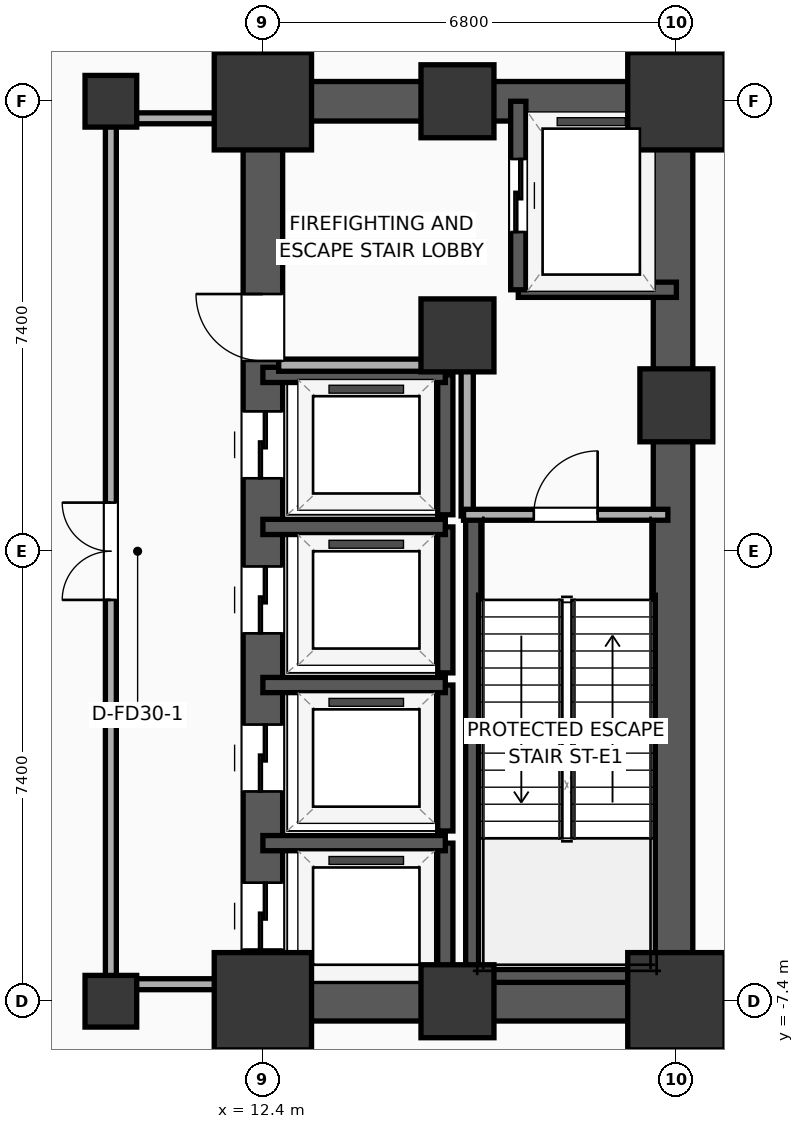
"""IFC4 building model, lengths in metres.
Left out: names, types, materials, properties, quantities, classifications, styles, units other than length and angle.
Written with IfcOpenShell. Run it as: python <this file> out.ifc"""

import sys

from ifc_helpers import new_model, si_unit, direction, frame, frame_2d, origin, origin_2d, place, context, subcontext, project, spatial, rectangle, extrude, element, fill, save


model = new_model("IFC4")
c1 = context("Model", 3, precision=1e-05, world=origin(), true_north=direction((0.0, 1.0)))
c2 = subcontext(c1, "Body", "Model", "MODEL_VIEW")
j1 = project(units=[si_unit("LENGTHUNIT", "METRE"), si_unit("PLANEANGLEUNIT", "RADIAN")], contexts=[c1])
p1 = place(None, origin())
s1 = spatial("IfcSite", under=j1, at=p1, CompositionType="ELEMENT")
p2 = place(p1, origin())
s2 = spatial("IfcBuilding", under=s1, at=p2, CompositionType="ELEMENT")
p3 = place(p2, frame((0.0, 0.0, -5.2)))
s3 = spatial("IfcBuildingStorey", under=s2, at=p3, CompositionType="ELEMENT", Elevation=-5.2)
p4 = place(p3, frame((12.4, -7.4, 0.0), z_axis=(0.0, 0.0, 1.0), x_axis=(1.0, 0.0, 0.0)))
e1 = element("IfcColumn", 1, at=p4, inside=s3, PredefinedType="COLUMN", context=c2, shape_type="SweptSolid", body=[
    extrude(rectangle(XDim=1.6, YDim=1.6, at=origin_2d()), origin(), (0.0, 0.0, 1.0), 5.2),
])
p5 = place(p3, frame((15.6, 3.55, 0.0), z_axis=(0.0, 0.0, 1.0), x_axis=(1.0, 0.0, 0.0)))
e2 = element("IfcColumn", 2, at=p5, inside=s3, PredefinedType="COLUMN", context=c2, shape_type="SweptSolid", body=[
    extrude(rectangle(XDim=1.2, YDim=1.2, at=origin_2d()), origin(), (0.0, 0.0, 1.0), 5.2),
])
p6 = place(p3, frame((12.4, 7.4, 0.0), z_axis=(0.0, 0.0, 1.0), x_axis=(1.0, 0.0, 0.0)))
e3 = element("IfcColumn", 3, at=p6, inside=s3, PredefinedType="COLUMN", context=c2, shape_type="SweptSolid", body=[
    extrude(rectangle(XDim=1.6, YDim=1.6, at=origin_2d()), origin(), (0.0, 0.0, 1.0), 5.2),
])
for number, where, z_axis, x_axis in (
    (4, (15.6, -7.4, 0.0), (0.0, 0.0, 1.0), (1.0, 0.0, 0.0)),
    (5, (15.6, 7.4, 0.0), (0.0, 0.0, 1.0), (1.0, 0.0, 0.0)),
):
    element("IfcColumn", number, at=place(p3, frame(where, z_axis=z_axis, x_axis=x_axis)), inside=s3, PredefinedType="COLUMN", context=c2, shape_type="SweptSolid", body=[
        extrude(rectangle(XDim=1.2, YDim=1.2, at=origin_2d()), origin(), (0.0, 0.0, 1.0), 5.2),
    ])
p7 = place(p3, frame((19.2, -7.4, 0.0), z_axis=(0.0, 0.0, 1.0), x_axis=(1.0, 0.0, 0.0)))
e6 = element("IfcColumn", 6, at=p7, inside=s3, PredefinedType="COLUMN", context=c2, shape_type="SweptSolid", body=[
    extrude(rectangle(XDim=1.6, YDim=1.6, at=origin_2d()), origin(), (0.0, 0.0, 1.0), 5.2),
])
p8 = place(p3, frame((19.2, 2.4, 0.0), z_axis=(0.0, 0.0, 1.0), x_axis=(1.0, 0.0, 0.0)))
e7 = element("IfcColumn", 7, at=p8, inside=s3, PredefinedType="COLUMN", context=c2, shape_type="SweptSolid", body=[
    extrude(rectangle(XDim=1.2, YDim=1.2, at=origin_2d()), origin(), (0.0, 0.0, 1.0), 5.2),
])
p9 = place(p3, frame((19.2, 7.4, 0.0), z_axis=(0.0, 0.0, 1.0), x_axis=(1.0, 0.0, 0.0)))
e8 = element("IfcColumn", 8, at=p9, inside=s3, PredefinedType="COLUMN", context=c2, shape_type="SweptSolid", body=[
    extrude(rectangle(XDim=1.6, YDim=1.6, at=origin_2d()), origin(), (0.0, 0.0, 1.0), 5.2),
])
for number, where, z_axis, x_axis in (
    (9, (12.075, -7.4, 0.0), (0.0, 0.0, 1.0), (1.0, 0.0, 0.0)),
    (10, (12.075, 7.4, 0.0), (0.0, 0.0, 1.0), (1.0, 0.0, 0.0)),
):
    element("IfcWall", number, at=place(p3, frame(where, z_axis=z_axis, x_axis=x_axis)), inside=s3, PredefinedType="SHEAR", context=c2, shape_type="SweptSolid", body=[
        extrude(rectangle(XDim=7.45, YDim=0.65, at=frame_2d((3.725, 0.0))), origin(), (0.0, 0.0, 1.0), 4.92),
    ])
p10 = place(p3, frame((12.4, -7.4, 0.0), z_axis=(0.0, 0.0, 1.0), x_axis=(0.0, 1.0, 0.0)))
e11 = element("IfcWall", 11, at=p10, inside=s3, PredefinedType="SHEAR", context=c2, shape_type="SweptSolid", body=[
    extrude(rectangle(XDim=14.8, YDim=0.65, at=frame_2d((7.4, 0.0))), origin(), (0.0, 0.0, 1.0), 4.92),
])
p11 = place(p10, frame((0.85, 0.0, 0.0)))
e12 = element("IfcOpeningElement", 12, at=p11, cuts=e11, PredefinedType="OPENING", context=c2, shape_type="SweptSolid", body=[
    extrude(rectangle(XDim=1.1, YDim=2.05, at=frame_2d((0.55, 1.025))), frame((0.0, 0.335, 0.0), z_axis=(0.0, -1.0, 0.0), x_axis=(1.0, 0.0, 0.0)), (0.0, 0.0, 1.0), 0.67),
])
p12 = place(p10, frame((3.45, 0.0, 0.0)))
e13 = element("IfcOpeningElement", 13, at=p12, cuts=e11, PredefinedType="OPENING", context=c2, shape_type="SweptSolid", body=[
    extrude(rectangle(XDim=1.1, YDim=2.05, at=frame_2d((0.55, 1.025))), frame((0.0, 0.335, 0.0), z_axis=(0.0, -1.0, 0.0), x_axis=(1.0, 0.0, 0.0)), (0.0, 0.0, 1.0), 0.67),
])
p13 = place(p10, frame((6.05, 0.0, 0.0)))
e14 = element("IfcOpeningElement", 14, at=p13, cuts=e11, PredefinedType="OPENING", context=c2, shape_type="SweptSolid", body=[
    extrude(rectangle(XDim=1.1, YDim=2.05, at=frame_2d((0.55, 1.025))), frame((0.0, 0.335, 0.0), z_axis=(0.0, -1.0, 0.0), x_axis=(1.0, 0.0, 0.0)), (0.0, 0.0, 1.0), 0.67),
])
p14 = place(p10, frame((8.6, 0.0, 0.0)))
e15 = element("IfcOpeningElement", 15, at=p14, cuts=e11, PredefinedType="OPENING", context=c2, shape_type="SweptSolid", body=[
    extrude(rectangle(XDim=1.1, YDim=2.05, at=frame_2d((0.55, 1.025))), frame((0.0, 0.335, 0.0), z_axis=(0.0, -1.0, 0.0), x_axis=(1.0, 0.0, 0.0)), (0.0, 0.0, 1.0), 0.67),
])
p15 = place(p10, frame((10.53, 0.0, 0.0)))
e16 = element("IfcOpeningElement", 16, at=p15, cuts=e11, PredefinedType="OPENING", context=c2, shape_type="SweptSolid", body=[
    extrude(rectangle(XDim=1.1, YDim=2.05, at=frame_2d((0.55, 1.025))), frame((0.0, 0.335, 0.0), z_axis=(0.0, -1.0, 0.0), x_axis=(1.0, 0.0, 0.0)), (0.0, 0.0, 1.0), 0.67),
])
p16 = place(p3, frame((19.145, -7.4, 0.0), z_axis=(0.0, 0.0, 1.0), x_axis=(0.0, 1.0, 0.0)))
e17 = element("IfcWall", 17, at=p16, inside=s3, PredefinedType="SHEAR", context=c2, shape_type="SweptSolid", body=[
    extrude(rectangle(XDim=14.8, YDim=0.65, at=frame_2d((7.4, 0.0))), origin(), (0.0, 0.0, 1.0), 4.92),
])
p17 = place(p3, frame((15.86, -7.085, 0.0), z_axis=(0.0, 0.0, 1.0), x_axis=(0.0, 1.0, 0.0)))
e18 = element("IfcWall", 18, at=p17, inside=s3, PredefinedType="SOLIDWALL", context=c2, shape_type="SweptSolid", body=[
    extrude(rectangle(XDim=7.685, YDim=0.25, at=frame_2d((3.843, 0.0))), origin(), (0.0, 0.0, 1.0), 4.92),
])
p18 = place(p3, frame((15.74, -6.965, 0.0), z_axis=(0.0, 0.0, 1.0), x_axis=(1.0, 0.0, 0.0)))
e19 = element("IfcWall", 19, at=p18, inside=s3, PredefinedType="SOLIDWALL", context=c2, shape_type="SweptSolid", body=[
    extrude(rectangle(XDim=3.46, YDim=0.25, at=frame_2d((1.73, 0.0))), origin(), (0.0, 0.0, 1.0), 4.92),
])
for number, where, z_axis, x_axis in (
    (20, (9.9, -7.4, 0.0), (0.0, 0.0, 1.0), (1.0, 0.0, 0.0)),
    (21, (9.9, 7.4, 0.0), (0.0, 0.0, 1.0), (1.0, 0.0, 0.0)),
):
    element("IfcColumn", number, at=place(p3, frame(where, z_axis=z_axis, x_axis=x_axis)), inside=s3, PredefinedType="COLUMN", context=c2, shape_type="SweptSolid", body=[
        extrude(rectangle(XDim=0.85, YDim=0.85, at=origin_2d()), origin(), (0.0, 0.0, 1.0), 5.2),
    ])
p19 = place(p3, frame((16.6, 4.3, 0.0), z_axis=(0.0, 0.0, 1.0), x_axis=(1.0, 0.0, 0.0)))
e22 = element("IfcWall", 22, at=p19, inside=s3, PredefinedType="SOLIDWALL", context=c2, shape_type="SweptSolid", body=[
    extrude(rectangle(XDim=2.6, YDim=0.25, at=frame_2d((1.3, 0.0))), origin(), (0.0, 0.0, 1.0), 4.92),
])
p20 = place(p3, frame((16.6, 7.4, 0.0), z_axis=(0.0, 0.0, 1.0), x_axis=(0.0, -1.0, 0.0)))
e23 = element("IfcWall", 23, at=p20, inside=s3, PredefinedType="SOLIDWALL", context=c2, shape_type="SweptSolid", body=[
    extrude(rectangle(XDim=3.1, YDim=0.25, at=frame_2d((1.55, 0.0))), origin(), (0.0, 0.0, 1.0), 4.92),
])
p21 = place(p20, frame((0.95, 0.0, 0.0)))
e24 = element("IfcOpeningElement", 24, at=p21, cuts=e23, PredefinedType="OPENING", context=c2, shape_type="SweptSolid", body=[
    extrude(rectangle(XDim=1.2, YDim=2.05, at=frame_2d((0.6, 1.025))), frame((0.0, 0.135, 0.0), z_axis=(0.0, -1.0, 0.0), x_axis=(1.0, 0.0, 0.0)), (0.0, 0.0, 1.0), 0.27),
])
p22 = place(p3, frame((15.4, -7.4, 0.0), z_axis=(0.0, 0.0, 1.0), x_axis=(0.0, 1.0, 0.0)))
e25 = element("IfcWall", 25, at=p22, inside=s3, PredefinedType="SOLIDWALL", context=c2, shape_type="SweptSolid", body=[
    extrude(rectangle(XDim=2.6, YDim=0.25, at=frame_2d((1.3, 0.0))), origin(), (0.0, 0.0, 1.0), 4.92),
])
p23 = place(p3, frame((15.4, -4.8, 0.0), z_axis=(0.0, 0.0, 1.0), x_axis=(-1.0, 0.0, 0.0)))
e26 = element("IfcWall", 26, at=p23, inside=s3, PredefinedType="SOLIDWALL", context=c2, shape_type="SweptSolid", body=[
    extrude(rectangle(XDim=3.0, YDim=0.25, at=frame_2d((1.5, 0.0))), origin(), (0.0, 0.0, 1.0), 4.92),
])
p24 = place(p3, frame((15.4, -4.6, 0.0), z_axis=(0.0, 0.0, 1.0), x_axis=(0.0, 1.0, 0.0)))
e27 = element("IfcWall", 27, at=p24, inside=s3, PredefinedType="SOLIDWALL", context=c2, shape_type="SweptSolid", body=[
    extrude(rectangle(XDim=2.4, YDim=0.25, at=frame_2d((1.2, 0.0))), origin(), (0.0, 0.0, 1.0), 4.92),
])
p25 = place(p3, frame((15.4, -2.2, 0.0), z_axis=(0.0, 0.0, 1.0), x_axis=(-1.0, 0.0, 0.0)))
e28 = element("IfcWall", 28, at=p25, inside=s3, PredefinedType="SOLIDWALL", context=c2, shape_type="SweptSolid", body=[
    extrude(rectangle(XDim=3.0, YDim=0.25, at=frame_2d((1.5, 0.0))), origin(), (0.0, 0.0, 1.0), 4.92),
])
p26 = place(p3, frame((15.4, -2.0, 0.0), z_axis=(0.0, 0.0, 1.0), x_axis=(0.0, 1.0, 0.0)))
e29 = element("IfcWall", 29, at=p26, inside=s3, PredefinedType="SOLIDWALL", context=c2, shape_type="SweptSolid", body=[
    extrude(rectangle(XDim=2.4, YDim=0.25, at=frame_2d((1.2, 0.0))), origin(), (0.0, 0.0, 1.0), 4.92),
])
p27 = place(p3, frame((15.4, 0.4, 0.0), z_axis=(0.0, 0.0, 1.0), x_axis=(-1.0, 0.0, 0.0)))
e30 = element("IfcWall", 30, at=p27, inside=s3, PredefinedType="SOLIDWALL", context=c2, shape_type="SweptSolid", body=[
    extrude(rectangle(XDim=3.0, YDim=0.25, at=frame_2d((1.5, 0.0))), origin(), (0.0, 0.0, 1.0), 4.92),
])
p28 = place(p3, frame((15.4, 0.6, 0.0), z_axis=(0.0, 0.0, 1.0), x_axis=(0.0, 1.0, 0.0)))
e31 = element("IfcWall", 31, at=p28, inside=s3, PredefinedType="SOLIDWALL", context=c2, shape_type="SweptSolid", body=[
    extrude(rectangle(XDim=2.3, YDim=0.25, at=frame_2d((1.15, 0.0))), origin(), (0.0, 0.0, 1.0), 4.92),
])
p29 = place(p3, frame((15.4, 2.9, 0.0), z_axis=(0.0, 0.0, 1.0), x_axis=(-1.0, 0.0, 0.0)))
e32 = element("IfcWall", 32, at=p29, inside=s3, PredefinedType="SOLIDWALL", context=c2, shape_type="SweptSolid", body=[
    extrude(rectangle(XDim=3.0, YDim=0.25, at=frame_2d((1.5, 0.0))), origin(), (0.0, 0.0, 1.0), 4.92),
])
p30 = place(p3, frame((15.76, 0.58, 0.0), z_axis=(0.0, 0.0, 1.0), x_axis=(0.0, 1.0, 0.0)))
e33 = element("IfcWall", 33, at=p30, inside=s3, PredefinedType="PARTITIONING", context=c2, shape_type="SweptSolid", body=[
    extrude(rectangle(XDim=2.52, YDim=0.2, at=frame_2d((1.26, 0.0))), origin(), (0.0, 0.0, 1.0), 4.92),
])
p31 = place(p3, frame((12.66, 3.06, 0.0), z_axis=(0.0, 0.0, 1.0), x_axis=(1.0, 0.0, 0.0)))
e34 = element("IfcWall", 34, at=p31, inside=s3, PredefinedType="PARTITIONING", context=c2, shape_type="SweptSolid", body=[
    extrude(rectangle(XDim=3.16, YDim=0.2, at=frame_2d((1.58, 0.0))), origin(), (0.0, 0.0, 1.0), 4.92),
])
p32 = place(p3, frame((15.7, 0.6, 0.0), z_axis=(0.0, 0.0, 1.0), x_axis=(1.0, 0.0, 0.0)))
e35 = element("IfcWall", 35, at=p32, inside=s3, PredefinedType="PARTITIONING", context=c2, shape_type="SweptSolid", body=[
    extrude(rectangle(XDim=3.36, YDim=0.18, at=frame_2d((1.68, 0.0))), origin(), (0.0, 0.0, 1.0), 4.92),
])
p33 = place(p32, frame((1.155, 0.0, 0.0)))
e36 = element("IfcOpeningElement", 36, at=p33, cuts=e35, PredefinedType="OPENING", context=c2, shape_type="SweptSolid", body=[
    extrude(rectangle(XDim=1.05, YDim=2.05, at=frame_2d((0.525, 1.025))), frame((0.0, 0.1, 0.0), z_axis=(0.0, -1.0, 0.0), x_axis=(1.0, 0.0, 0.0)), (0.0, 0.0, 1.0), 0.2),
])
for number, where, z_axis, x_axis in (
    (37, (9.88, 7.12, 0.0), (0.0, 0.0, 1.0), (1.0, 0.0, 0.0)),
    (38, (9.88, -7.12, 0.0), (0.0, 0.0, 1.0), (1.0, 0.0, 0.0)),
):
    element("IfcWall", number, at=place(p3, frame(where, z_axis=z_axis, x_axis=x_axis)), inside=s3, PredefinedType="PARTITIONING", context=c2, shape_type="SweptSolid", body=[
        extrude(rectangle(XDim=2.27, YDim=0.18, at=frame_2d((1.135, 0.0))), origin(), (0.0, 0.0, 1.0), 4.11),
    ])
p34 = place(p3, frame((9.9, -7.12, 0.0), z_axis=(0.0, 0.0, 1.0), x_axis=(0.0, 1.0, 0.0)))
e39 = element("IfcWall", 39, at=p34, inside=s3, PredefinedType="PARTITIONING", context=c2, shape_type="SweptSolid", body=[
    extrude(rectangle(XDim=14.24, YDim=0.18, at=frame_2d((7.12, 0.0))), origin(), (0.0, 0.0, 1.0), 4.11),
])
p35 = place(p34, frame((6.32, 0.0, 0.0)))
e40 = element("IfcOpeningElement", 40, at=p35, cuts=e39, PredefinedType="OPENING", context=c2, shape_type="SweptSolid", body=[
    extrude(rectangle(XDim=1.6, YDim=2.05, at=frame_2d((0.8, 1.025))), frame((0.0, 0.1, 0.0), z_axis=(0.0, -1.0, 0.0), x_axis=(1.0, 0.0, 0.0)), (0.0, 0.0, 1.0), 0.2),
])
p36 = place(p21, origin())
e41 = element("IfcDoor", 41, at=p36, inside=s3, OperationType="SLIDING_TO_LEFT", PredefinedType="DOOR", context=c2, shape_type="SweptSolid", body=[
    extrude(rectangle(XDim=1.2, YDim=2.05, at=frame_2d((0.6, 1.025))), frame((0.0, 0.025, 0.0), z_axis=(0.0, -1.0, 0.0), x_axis=(1.0, 0.0, 0.0)), (0.0, 0.0, 1.0), 0.05),
])
fill(e24, e41)
p37 = place(p11, origin())
e42 = element("IfcDoor", 42, at=p37, inside=s3, OperationType="SLIDING_TO_LEFT", PredefinedType="DOOR", context=c2, shape_type="SweptSolid", body=[
    extrude(rectangle(XDim=1.1, YDim=2.05, at=frame_2d((0.55, 1.025))), frame((0.0, 0.025, 0.0), z_axis=(0.0, -1.0, 0.0), x_axis=(1.0, 0.0, 0.0)), (0.0, 0.0, 1.0), 0.05),
])
fill(e12, e42)
p38 = place(p12, origin())
e43 = element("IfcDoor", 43, at=p38, inside=s3, OperationType="SLIDING_TO_LEFT", PredefinedType="DOOR", context=c2, shape_type="SweptSolid", body=[
    extrude(rectangle(XDim=1.1, YDim=2.05, at=frame_2d((0.55, 1.025))), frame((0.0, 0.025, 0.0), z_axis=(0.0, -1.0, 0.0), x_axis=(1.0, 0.0, 0.0)), (0.0, 0.0, 1.0), 0.05),
])
fill(e13, e43)
p39 = place(p13, origin())
e44 = element("IfcDoor", 44, at=p39, inside=s3, OperationType="SLIDING_TO_LEFT", PredefinedType="DOOR", context=c2, shape_type="SweptSolid", body=[
    extrude(rectangle(XDim=1.1, YDim=2.05, at=frame_2d((0.55, 1.025))), frame((0.0, 0.025, 0.0), z_axis=(0.0, -1.0, 0.0), x_axis=(1.0, 0.0, 0.0)), (0.0, 0.0, 1.0), 0.05),
])
fill(e14, e44)
p40 = place(p14, origin())
e45 = element("IfcDoor", 45, at=p40, inside=s3, OperationType="SLIDING_TO_LEFT", PredefinedType="DOOR", context=c2, shape_type="SweptSolid", body=[
    extrude(rectangle(XDim=1.1, YDim=2.05, at=frame_2d((0.55, 1.025))), frame((0.0, 0.025, 0.0), z_axis=(0.0, -1.0, 0.0), x_axis=(1.0, 0.0, 0.0)), (0.0, 0.0, 1.0), 0.05),
])
fill(e15, e45)
p41 = place(p33, origin())
e46 = element("IfcDoor", 46, at=p41, inside=s3, OperationType="SINGLE_SWING_RIGHT", PredefinedType="DOOR", context=c2, shape_type="SweptSolid", body=[
    extrude(rectangle(XDim=1.05, YDim=2.05, at=frame_2d((0.525, 1.025))), frame((0.0, 0.025, 0.0), z_axis=(0.0, -1.0, 0.0), x_axis=(1.0, 0.0, 0.0)), (0.0, 0.0, 1.0), 0.05),
])
fill(e36, e46)
p42 = place(p35, origin())
e47 = element("IfcDoor", 47, at=p42, inside=s3, OperationType="DOUBLE_DOOR_SINGLE_SWING", PredefinedType="DOOR", context=c2, shape_type="SweptSolid", body=[
    extrude(rectangle(XDim=1.6, YDim=2.05, at=frame_2d((0.8, 1.025))), frame((0.0, 0.025, 0.0), z_axis=(0.0, -1.0, 0.0), x_axis=(1.0, 0.0, 0.0)), (0.0, 0.0, 1.0), 0.05),
])
fill(e40, e47)
p43 = place(p15, origin())
e48 = element("IfcDoor", 48, at=p43, inside=s3, OperationType="SINGLE_SWING_RIGHT", PredefinedType="DOOR", context=c2, shape_type="SweptSolid", body=[
    extrude(rectangle(XDim=1.1, YDim=2.05, at=frame_2d((0.55, 1.025))), frame((0.0, 0.025, 0.0), z_axis=(0.0, -1.0, 0.0), x_axis=(1.0, 0.0, 0.0)), (0.0, 0.0, 1.0), 0.05),
])
fill(e16, e48)
save(model, sys.argv[1])
